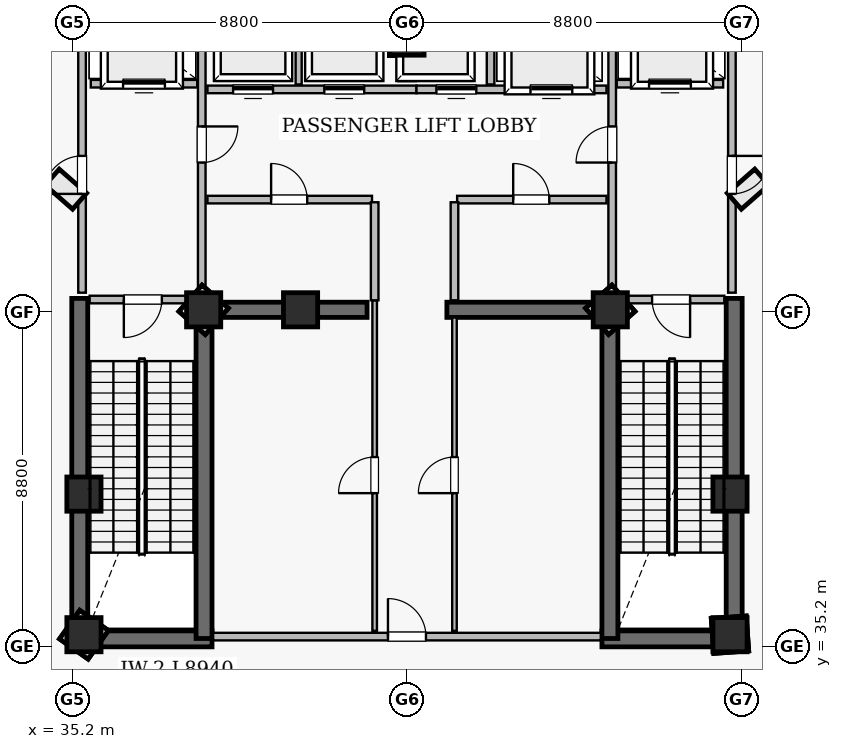
"""IFC4 building model, lengths in metres.
Left out: names, types, materials, properties, quantities, classifications, styles, units other than length and angle.
Written with IfcOpenShell. Run it as: python <this file> out.ifc"""

import sys

from ifc_helpers import new_model, si_unit, direction, frame, frame_2d, origin, origin_2d, place, context, subcontext, project, spatial, rectangle, extrude, element, fill, save


model = new_model("IFC4")
c1 = context("Model", 3, precision=1e-05, world=origin(), true_north=direction((0.0, 1.0)))
c2 = subcontext(c1, "Body", "Model", "MODEL_VIEW")
j1 = project(units=[si_unit("LENGTHUNIT", "METRE"), si_unit("PLANEANGLEUNIT", "RADIAN")], contexts=[c1])
p1 = place(None, origin())
s1 = spatial("IfcSite", under=j1, at=p1, CompositionType="ELEMENT")
p2 = place(p1, origin())
s2 = spatial("IfcBuilding", under=s1, at=p2, CompositionType="ELEMENT")
p3 = place(p2, frame((0.0, 0.0, 282.8)))
s3 = spatial("IfcBuildingStorey", under=s2, at=p3, CompositionType="ELEMENT", Elevation=282.8)
for number, where, z_axis, x_axis in (
    (1, (35.18, 35.39, 0.0), (0.0, 0.0, 1.0), (1.0, 0.0, 0.0)),
    (2, (49.13, 35.39, 0.0), (0.0, 0.0, 1.0), (1.0, 0.0, 0.0)),
):
    element("IfcWall", number, at=place(p3, frame(where, z_axis=z_axis, x_axis=x_axis)), inside=s3, PredefinedType="SHEAR", context=c2, shape_type="SweptSolid", body=[
        extrude(rectangle(XDim=3.69, YDim=0.42, at=frame_2d((1.845, 0.0))), origin(), (0.0, 0.0, 1.0), 6.51),
    ])
for number, where, z_axis, x_axis in (
    (3, (35.39, 35.18, 0.0), (0.0, 0.0, 1.0), (0.0, 1.0, 0.0)),
    (4, (52.61, 35.18, 0.0), (0.0, 0.0, 1.0), (0.0, 1.0, 0.0)),
):
    element("IfcWall", number, at=place(p3, frame(where, z_axis=z_axis, x_axis=x_axis)), inside=s3, PredefinedType="SHEAR", context=c2, shape_type="SweptSolid", body=[
        extrude(rectangle(XDim=9.17, YDim=0.42, at=frame_2d((4.585, 0.0))), origin(), (0.0, 0.0, 1.0), 6.51),
    ])
for number, where, z_axis, x_axis in (
    (5, (38.66, 35.4, 0.0), (0.0, 0.0, 1.0), (0.0, 1.0, 0.0)),
    (6, (49.34, 35.4, 0.0), (0.0, 0.0, 1.0), (0.0, 1.0, 0.0)),
):
    element("IfcWall", number, at=place(p3, frame(where, z_axis=z_axis, x_axis=x_axis)), inside=s3, PredefinedType="SHEAR", context=c2, shape_type="SweptSolid", body=[
        extrude(rectangle(XDim=8.95, YDim=0.42, at=frame_2d((4.475, 0.0))), origin(), (0.0, 0.0, 1.0), 6.51),
    ])
p4 = place(p3, frame((44.0, 50.1, 0.0), z_axis=(0.0, 0.0, 1.0), x_axis=(0.0, 1.0, 0.0)))
e7 = element("IfcWall", 7, at=p4, inside=s3, PredefinedType="SHEAR", context=c2, shape_type="SweptSolid", body=[
    extrude(rectangle(XDim=2.1, YDim=0.4, at=frame_2d((1.05, 0.0))), origin(), (0.0, 0.0, 1.0), 6.51),
])
for number, where, z_axis, x_axis in (
    (8, (38.75, 44.05, 0.0), (0.0, 0.0, 1.0), (1.0, 0.0, 0.0)),
    (9, (45.05, 44.05, 0.0), (0.0, 0.0, 1.0), (1.0, 0.0, 0.0)),
):
    element("IfcWall", number, at=place(p3, frame(where, z_axis=z_axis, x_axis=x_axis)), inside=s3, PredefinedType="SHEAR", context=c2, shape_type="SweptSolid", body=[
        extrude(rectangle(XDim=4.2, YDim=0.4, at=frame_2d((2.1, 0.0))), origin(), (0.0, 0.0, 1.0), 6.51),
    ])
for number, where, z_axis, x_axis in (
    (10, (35.5, 35.5, 0.0), (0.0, 0.0, 1.0), (1.0, 0.0, 0.0)),
    (11, (38.65, 44.05, 0.0), (0.0, 0.0, 1.0), (1.0, 0.0, 0.0)),
    (12, (52.5, 35.5, 0.0), (0.0, 0.0, 1.0), (1.0, 0.0, 0.0)),
    (13, (52.5, 39.2, 0.0), (0.0, 0.0, 1.0), (1.0, 0.0, 0.0)),
    (14, (49.35, 44.05, 0.0), (0.0, 0.0, 1.0), (1.0, 0.0, 0.0)),
    (15, (44.0, 51.2, 0.0), (0.0, 0.0, 1.0), (1.0, 0.0, 0.0)),
    (16, (35.5, 39.2, 0.0), (0.0, 0.0, 1.0), (1.0, 0.0, 0.0)),
    (17, (41.2, 44.05, 0.0), (0.0, 0.0, 1.0), (1.0, 0.0, 0.0)),
):
    element("IfcColumn", number, at=place(p3, frame(where, z_axis=z_axis, x_axis=x_axis)), inside=s3, PredefinedType="COLUMN", context=c2, shape_type="SweptSolid", body=[
        extrude(rectangle(XDim=0.9, YDim=0.9, at=origin_2d()), origin(), (0.0, 0.0, 1.0), 6.8),
    ])
p5 = place(p3, frame((38.9, 35.45, 0.0), z_axis=(0.0, 0.0, 1.0), x_axis=(1.0, 0.0, 0.0)))
e18 = element("IfcWall", 18, at=p5, inside=s3, PredefinedType="SOLIDWALL", context=c2, shape_type="SweptSolid", body=[
    extrude(rectangle(XDim=10.2, YDim=0.2, at=frame_2d((5.1, 0.0))), origin(), (0.0, 0.0, 1.0), 6.51),
])
p6 = place(p5, frame((4.6, 0.0, 0.0)))
e19 = element("IfcOpeningElement", 19, at=p6, cuts=e18, PredefinedType="OPENING", context=c2, shape_type="SweptSolid", body=[
    extrude(rectangle(XDim=1.0, YDim=2.15, at=frame_2d((0.5, 1.075))), frame((0.0, 0.11, 0.0), z_axis=(0.0, -1.0, 0.0), x_axis=(1.0, 0.0, 0.0)), (0.0, 0.0, 1.0), 0.22),
])
p7 = place(p3, frame((43.15, 35.6, 0.0), z_axis=(0.0, 0.0, 1.0), x_axis=(0.0, 1.0, 0.0)))
e20 = element("IfcWall", 20, at=p7, inside=s3, PredefinedType="PARTITIONING", context=c2, shape_type="SweptSolid", body=[
    extrude(rectangle(XDim=8.7, YDim=0.12, at=frame_2d((4.35, 0.0))), origin(), (0.0, 0.0, 1.0), 6.51),
])
p8 = place(p7, frame((3.625, 0.0, 0.0)))
e21 = element("IfcOpeningElement", 21, at=p8, cuts=e20, PredefinedType="OPENING", context=c2, shape_type="SweptSolid", body=[
    extrude(rectangle(XDim=0.95, YDim=2.1, at=frame_2d((0.475, 1.05))), frame((0.0, 0.07, 0.0), z_axis=(0.0, -1.0, 0.0), x_axis=(1.0, 0.0, 0.0)), (0.0, 0.0, 1.0), 0.14),
])
p9 = place(p3, frame((45.25, 35.6, 0.0), z_axis=(0.0, 0.0, 1.0), x_axis=(0.0, 1.0, 0.0)))
e22 = element("IfcWall", 22, at=p9, inside=s3, PredefinedType="PARTITIONING", context=c2, shape_type="SweptSolid", body=[
    extrude(rectangle(XDim=8.25, YDim=0.12, at=frame_2d((4.125, 0.0))), origin(), (0.0, 0.0, 1.0), 6.51),
])
p10 = place(p9, frame((3.625, 0.0, 0.0)))
e23 = element("IfcOpeningElement", 23, at=p10, cuts=e22, PredefinedType="OPENING", context=c2, shape_type="SweptSolid", body=[
    extrude(rectangle(XDim=0.95, YDim=2.1, at=frame_2d((0.475, 1.05))), frame((0.0, 0.07, 0.0), z_axis=(0.0, -1.0, 0.0), x_axis=(1.0, 0.0, 0.0)), (0.0, 0.0, 1.0), 0.14),
])
p11 = place(p3, frame((35.45, 44.5, 0.0), z_axis=(0.0, 0.0, 1.0), x_axis=(0.0, 1.0, 0.0)))
e24 = element("IfcWall", 24, at=p11, inside=s3, PredefinedType="SOLIDWALL", context=c2, shape_type="SweptSolid", body=[
    extrude(rectangle(XDim=7.92, YDim=0.2, at=frame_2d((3.96, 0.0))), origin(), (0.0, 0.0, 1.0), 6.51),
])
p12 = place(p11, frame((2.6, 0.0, 0.0)))
e25 = element("IfcOpeningElement", 25, at=p12, cuts=e24, PredefinedType="OPENING", context=c2, shape_type="SweptSolid", body=[
    extrude(rectangle(XDim=1.0, YDim=2.15, at=frame_2d((0.5, 1.075))), frame((0.0, 0.11, 0.0), z_axis=(0.0, -1.0, 0.0), x_axis=(1.0, 0.0, 0.0)), (0.0, 0.0, 1.0), 0.22),
])
p13 = place(p3, frame((52.55, 44.5, 0.0), z_axis=(0.0, 0.0, 1.0), x_axis=(0.0, 1.0, 0.0)))
e26 = element("IfcWall", 26, at=p13, inside=s3, PredefinedType="SOLIDWALL", context=c2, shape_type="SweptSolid", body=[
    extrude(rectangle(XDim=7.92, YDim=0.2, at=frame_2d((3.96, 0.0))), origin(), (0.0, 0.0, 1.0), 6.51),
])
p14 = place(p13, frame((2.6, 0.0, 0.0)))
e27 = element("IfcOpeningElement", 27, at=p14, cuts=e26, PredefinedType="OPENING", context=c2, shape_type="SweptSolid", body=[
    extrude(rectangle(XDim=1.0, YDim=2.15, at=frame_2d((0.5, 1.075))), frame((0.0, 0.11, 0.0), z_axis=(0.0, -1.0, 0.0), x_axis=(1.0, 0.0, 0.0)), (0.0, 0.0, 1.0), 0.22),
])
p15 = place(p3, frame((38.6, 44.5, 0.0), z_axis=(0.0, 0.0, 1.0), x_axis=(0.0, 1.0, 0.0)))
e28 = element("IfcWall", 28, at=p15, inside=s3, PredefinedType="SOLIDWALL", context=c2, shape_type="SweptSolid", body=[
    extrude(rectangle(XDim=7.92, YDim=0.2, at=frame_2d((3.96, 0.0))), origin(), (0.0, 0.0, 1.0), 6.51),
])
p16 = place(p15, frame((3.425, 0.0, 0.0)))
e29 = element("IfcOpeningElement", 29, at=p16, cuts=e28, PredefinedType="OPENING", context=c2, shape_type="SweptSolid", body=[
    extrude(rectangle(XDim=0.95, YDim=2.15, at=frame_2d((0.475, 1.075))), frame((0.0, 0.11, 0.0), z_axis=(0.0, -1.0, 0.0), x_axis=(1.0, 0.0, 0.0)), (0.0, 0.0, 1.0), 0.22),
])
p17 = place(p3, frame((49.4, 44.5, 0.0), z_axis=(0.0, 0.0, 1.0), x_axis=(0.0, 1.0, 0.0)))
e30 = element("IfcWall", 30, at=p17, inside=s3, PredefinedType="SOLIDWALL", context=c2, shape_type="SweptSolid", body=[
    extrude(rectangle(XDim=7.92, YDim=0.2, at=frame_2d((3.96, 0.0))), origin(), (0.0, 0.0, 1.0), 5.598),
])
p18 = place(p17, frame((3.425, 0.0, 0.0)))
e31 = element("IfcOpeningElement", 31, at=p18, cuts=e30, PredefinedType="OPENING", context=c2, shape_type="SweptSolid", body=[
    extrude(rectangle(XDim=0.95, YDim=2.15, at=frame_2d((0.475, 1.075))), frame((0.0, 0.11, 0.0), z_axis=(0.0, -1.0, 0.0), x_axis=(1.0, 0.0, 0.0)), (0.0, 0.0, 1.0), 0.22),
])
p19 = place(p3, frame((38.75, 49.85, 0.0), z_axis=(0.0, 0.0, 1.0), x_axis=(1.0, 0.0, 0.0)))
e32 = element("IfcWall", 32, at=p19, inside=s3, PredefinedType="SOLIDWALL", context=c2, shape_type="SweptSolid", body=[
    extrude(rectangle(XDim=5.5, YDim=0.2, at=frame_2d((2.75, 0.0))), origin(), (0.0, 0.0, 1.0), 6.51),
])
p20 = place(p19, frame((0.675, 0.0, 0.0)))
e33 = element("IfcOpeningElement", 33, at=p20, cuts=e32, PredefinedType="OPENING", context=c2, shape_type="SweptSolid", body=[
    extrude(rectangle(XDim=1.05, YDim=2.15, at=frame_2d((0.525, 1.075))), frame((0.0, 0.11, 0.0), z_axis=(0.0, -1.0, 0.0), x_axis=(1.0, 0.0, 0.0)), (0.0, 0.0, 1.0), 0.22),
])
p21 = place(p19, frame((3.075, 0.0, 0.0)))
e34 = element("IfcOpeningElement", 34, at=p21, cuts=e32, PredefinedType="OPENING", context=c2, shape_type="SweptSolid", body=[
    extrude(rectangle(XDim=1.05, YDim=2.15, at=frame_2d((0.525, 1.075))), frame((0.0, 0.11, 0.0), z_axis=(0.0, -1.0, 0.0), x_axis=(1.0, 0.0, 0.0)), (0.0, 0.0, 1.0), 0.22),
])
p22 = place(p3, frame((44.25, 49.85, 0.0), z_axis=(0.0, 0.0, 1.0), x_axis=(1.0, 0.0, 0.0)))
e35 = element("IfcWall", 35, at=p22, inside=s3, PredefinedType="SOLIDWALL", context=c2, shape_type="SweptSolid", body=[
    extrude(rectangle(XDim=5.0, YDim=0.2, at=frame_2d((2.5, 0.0))), origin(), (0.0, 0.0, 1.0), 5.598),
])
p23 = place(p22, frame((0.525, 0.0, 0.0)))
e36 = element("IfcOpeningElement", 36, at=p23, cuts=e35, PredefinedType="OPENING", context=c2, shape_type="SweptSolid", body=[
    extrude(rectangle(XDim=1.05, YDim=2.15, at=frame_2d((0.525, 1.075))), frame((0.0, 0.11, 0.0), z_axis=(0.0, -1.0, 0.0), x_axis=(1.0, 0.0, 0.0)), (0.0, 0.0, 1.0), 0.22),
])
p24 = place(p22, frame((3.0, 0.0, 0.0)))
e37 = element("IfcOpeningElement", 37, at=p24, cuts=e35, PredefinedType="OPENING", context=c2, shape_type="SweptSolid", body=[
    extrude(rectangle(XDim=1.1, YDim=2.15, at=frame_2d((0.55, 1.075))), frame((0.0, 0.11, 0.0), z_axis=(0.0, -1.0, 0.0), x_axis=(1.0, 0.0, 0.0)), (0.0, 0.0, 1.0), 0.22),
])
p25 = place(p3, frame((38.75, 46.95, 0.0), z_axis=(0.0, 0.0, 1.0), x_axis=(1.0, 0.0, 0.0)))
e38 = element("IfcWall", 38, at=p25, inside=s3, PredefinedType="SOLIDWALL", context=c2, shape_type="SweptSolid", body=[
    extrude(rectangle(XDim=4.33, YDim=0.2, at=frame_2d((2.165, 0.0))), origin(), (0.0, 0.0, 1.0), 6.51),
])
p26 = place(p25, frame((1.675, 0.0, 0.0)))
e39 = element("IfcOpeningElement", 39, at=p26, cuts=e38, PredefinedType="OPENING", context=c2, shape_type="SweptSolid", body=[
    extrude(rectangle(XDim=0.95, YDim=2.1, at=frame_2d((0.475, 1.05))), frame((0.0, 0.11, 0.0), z_axis=(0.0, -1.0, 0.0), x_axis=(1.0, 0.0, 0.0)), (0.0, 0.0, 1.0), 0.22),
])
p27 = place(p3, frame((45.32, 46.95, 0.0), z_axis=(0.0, 0.0, 1.0), x_axis=(1.0, 0.0, 0.0)))
e40 = element("IfcWall", 40, at=p27, inside=s3, PredefinedType="SOLIDWALL", context=c2, shape_type="SweptSolid", body=[
    extrude(rectangle(XDim=3.93, YDim=0.2, at=frame_2d((1.965, 0.0))), origin(), (0.0, 0.0, 1.0), 5.598),
])
p28 = place(p27, frame((1.475, 0.0, 0.0)))
e41 = element("IfcOpeningElement", 41, at=p28, cuts=e40, PredefinedType="OPENING", context=c2, shape_type="SweptSolid", body=[
    extrude(rectangle(XDim=0.95, YDim=2.1, at=frame_2d((0.475, 1.05))), frame((0.0, 0.11, 0.0), z_axis=(0.0, -1.0, 0.0), x_axis=(1.0, 0.0, 0.0)), (0.0, 0.0, 1.0), 0.22),
])
p29 = place(p3, frame((35.65, 44.32, 0.0), z_axis=(0.0, 0.0, 1.0), x_axis=(1.0, 0.0, 0.0)))
e42 = element("IfcWall", 42, at=p29, inside=s3, PredefinedType="SOLIDWALL", context=c2, shape_type="SweptSolid", body=[
    extrude(rectangle(XDim=2.8, YDim=0.2, at=frame_2d((1.4, 0.0))), origin(), (0.0, 0.0, 1.0), 6.51),
])
p30 = place(p29, frame((0.9, 0.0, 0.0)))
e43 = element("IfcOpeningElement", 43, at=p30, cuts=e42, PredefinedType="OPENING", context=c2, shape_type="SweptSolid", body=[
    extrude(rectangle(XDim=1.0, YDim=2.15, at=frame_2d((0.5, 1.075))), frame((0.0, 0.11, 0.0), z_axis=(0.0, -1.0, 0.0), x_axis=(1.0, 0.0, 0.0)), (0.0, 0.0, 1.0), 0.22),
])
p31 = place(p3, frame((49.55, 44.32, 0.0), z_axis=(0.0, 0.0, 1.0), x_axis=(1.0, 0.0, 0.0)))
e44 = element("IfcWall", 44, at=p31, inside=s3, PredefinedType="SOLIDWALL", context=c2, shape_type="SweptSolid", body=[
    extrude(rectangle(XDim=2.8, YDim=0.2, at=frame_2d((1.4, 0.0))), origin(), (0.0, 0.0, 1.0), 5.598),
])
p32 = place(p31, frame((0.9, 0.0, 0.0)))
e45 = element("IfcOpeningElement", 45, at=p32, cuts=e44, PredefinedType="OPENING", context=c2, shape_type="SweptSolid", body=[
    extrude(rectangle(XDim=1.0, YDim=2.15, at=frame_2d((0.5, 1.075))), frame((0.0, 0.11, 0.0), z_axis=(0.0, -1.0, 0.0), x_axis=(1.0, 0.0, 0.0)), (0.0, 0.0, 1.0), 0.22),
])
p33 = place(p3, frame((35.68, 50.0, 0.0), z_axis=(0.0, 0.0, 1.0), x_axis=(1.0, 0.0, 0.0)))
e46 = element("IfcWall", 46, at=p33, inside=s3, PredefinedType="SOLIDWALL", context=c2, shape_type="SweptSolid", body=[
    extrude(rectangle(XDim=2.8, YDim=0.2, at=frame_2d((1.4, 0.0))), origin(), (0.0, 0.0, 1.0), 6.51),
])
p34 = place(p33, frame((0.85, 0.0, 0.0)))
e47 = element("IfcOpeningElement", 47, at=p34, cuts=e46, PredefinedType="OPENING", context=c2, shape_type="SweptSolid", body=[
    extrude(rectangle(XDim=1.1, YDim=2.15, at=frame_2d((0.55, 1.075))), frame((0.0, 0.11, 0.0), z_axis=(0.0, -1.0, 0.0), x_axis=(1.0, 0.0, 0.0)), (0.0, 0.0, 1.0), 0.22),
])
p35 = place(p3, frame((49.52, 50.0, 0.0), z_axis=(0.0, 0.0, 1.0), x_axis=(1.0, 0.0, 0.0)))
e48 = element("IfcWall", 48, at=p35, inside=s3, PredefinedType="SOLIDWALL", context=c2, shape_type="SweptSolid", body=[
    extrude(rectangle(XDim=2.8, YDim=0.2, at=frame_2d((1.4, 0.0))), origin(), (0.0, 0.0, 1.0), 6.51),
])
p36 = place(p35, frame((0.85, 0.0, 0.0)))
e49 = element("IfcOpeningElement", 49, at=p36, cuts=e48, PredefinedType="OPENING", context=c2, shape_type="SweptSolid", body=[
    extrude(rectangle(XDim=1.1, YDim=2.15, at=frame_2d((0.55, 1.075))), frame((0.0, 0.11, 0.0), z_axis=(0.0, -1.0, 0.0), x_axis=(1.0, 0.0, 0.0)), (0.0, 0.0, 1.0), 0.22),
])
for number, where, z_axis, x_axis in (
    (50, (43.15, 44.3, 0.0), (0.0, 0.0, 1.0), (0.0, 1.0, 0.0)),
    (51, (45.25, 44.3, 0.0), (0.0, 0.0, 1.0), (0.0, 1.0, 0.0)),
):
    element("IfcWall", number, at=place(p3, frame(where, z_axis=z_axis, x_axis=x_axis)), inside=s3, PredefinedType="SOLIDWALL", context=c2, shape_type="SweptSolid", body=[
        extrude(rectangle(XDim=2.58, YDim=0.2, at=frame_2d((1.29, 0.0))), origin(), (0.0, 0.0, 1.0), 6.51),
    ])
p37 = place(p3, frame((41.15, 49.98, 0.0), z_axis=(0.0, 0.0, 1.0), x_axis=(0.0, 1.0, 0.0)))
e52 = element("IfcWall", 52, at=p37, inside=s3, PredefinedType="SOLIDWALL", context=c2, shape_type="SweptSolid", body=[
    extrude(rectangle(XDim=2.37, YDim=0.16, at=frame_2d((1.185, 0.0))), origin(), (0.0, 0.0, 1.0), 6.51),
])
p38 = place(p3, frame((46.2, 49.98, 0.0), z_axis=(0.0, 0.0, 1.0), x_axis=(0.0, 1.0, 0.0)))
e53 = element("IfcWall", 53, at=p38, inside=s3, PredefinedType="SOLIDWALL", context=c2, shape_type="SweptSolid", body=[
    extrude(rectangle(XDim=2.37, YDim=0.2, at=frame_2d((1.185, 0.0))), origin(), (0.0, 0.0, 1.0), 6.51),
])
p39 = place(p30, frame((1.0, 0.0, 0.0), z_axis=(0.0, 0.0, 1.0), x_axis=(-1.0, 0.0, 0.0)))
e54 = element("IfcDoor", 54, at=p39, inside=s3, OperationType="SINGLE_SWING_LEFT", PredefinedType="DOOR", context=c2, shape_type="SweptSolid", body=[
    extrude(rectangle(XDim=1.0, YDim=2.15, at=frame_2d((0.5, 1.075))), frame((0.0, 0.025, 0.0), z_axis=(0.0, -1.0, 0.0), x_axis=(1.0, 0.0, 0.0)), (0.0, 0.0, 1.0), 0.05),
])
fill(e43, e54)
p40 = place(p32, frame((1.0, 0.0, 0.0), z_axis=(0.0, 0.0, 1.0), x_axis=(-1.0, 0.0, 0.0)))
e55 = element("IfcDoor", 55, at=p40, inside=s3, OperationType="SINGLE_SWING_RIGHT", PredefinedType="DOOR", context=c2, shape_type="SweptSolid", body=[
    extrude(rectangle(XDim=1.0, YDim=2.15, at=frame_2d((0.5, 1.075))), frame((0.0, 0.025, 0.0), z_axis=(0.0, -1.0, 0.0), x_axis=(1.0, 0.0, 0.0)), (0.0, 0.0, 1.0), 0.05),
])
fill(e45, e55)
p41 = place(p12, origin())
e56 = element("IfcDoor", 56, at=p41, inside=s3, OperationType="SINGLE_SWING_LEFT", PredefinedType="DOOR", context=c2, shape_type="SweptSolid", body=[
    extrude(rectangle(XDim=1.0, YDim=2.15, at=frame_2d((0.5, 1.075))), frame((0.0, 0.025, 0.0), z_axis=(0.0, -1.0, 0.0), x_axis=(1.0, 0.0, 0.0)), (0.0, 0.0, 1.0), 0.05),
])
fill(e25, e56)
p42 = place(p14, frame((1.0, 0.0, 0.0), z_axis=(0.0, 0.0, 1.0), x_axis=(-1.0, 0.0, 0.0)))
e57 = element("IfcDoor", 57, at=p42, inside=s3, OperationType="SINGLE_SWING_RIGHT", PredefinedType="DOOR", context=c2, shape_type="SweptSolid", body=[
    extrude(rectangle(XDim=1.0, YDim=2.15, at=frame_2d((0.5, 1.075))), frame((0.0, 0.025, 0.0), z_axis=(0.0, -1.0, 0.0), x_axis=(1.0, 0.0, 0.0)), (0.0, 0.0, 1.0), 0.05),
])
fill(e27, e57)
p43 = place(p16, frame((0.95, 0.0, 0.0), z_axis=(0.0, 0.0, 1.0), x_axis=(-1.0, 0.0, 0.0)))
e58 = element("IfcDoor", 58, at=p43, inside=s3, OperationType="SINGLE_SWING_RIGHT", PredefinedType="DOOR", context=c2, shape_type="SweptSolid", body=[
    extrude(rectangle(XDim=0.95, YDim=2.15, at=frame_2d((0.475, 1.075))), frame((0.0, 0.025, 0.0), z_axis=(0.0, -1.0, 0.0), x_axis=(1.0, 0.0, 0.0)), (0.0, 0.0, 1.0), 0.05),
])
fill(e29, e58)
p44 = place(p18, origin())
e59 = element("IfcDoor", 59, at=p44, inside=s3, OperationType="SINGLE_SWING_LEFT", PredefinedType="DOOR", context=c2, shape_type="SweptSolid", body=[
    extrude(rectangle(XDim=0.95, YDim=2.15, at=frame_2d((0.475, 1.075))), frame((0.0, 0.025, 0.0), z_axis=(0.0, -1.0, 0.0), x_axis=(1.0, 0.0, 0.0)), (0.0, 0.0, 1.0), 0.05),
])
fill(e31, e59)
p45 = place(p34, origin())
e60 = element("IfcDoor", 60, at=p45, inside=s3, OperationType="SLIDING_TO_LEFT", PredefinedType="DOOR", context=c2, shape_type="SweptSolid", body=[
    extrude(rectangle(XDim=1.1, YDim=2.15, at=frame_2d((0.55, 1.075))), frame((0.0, 0.025, 0.0), z_axis=(0.0, -1.0, 0.0), x_axis=(1.0, 0.0, 0.0)), (0.0, 0.0, 1.0), 0.05),
])
fill(e47, e60)
p46 = place(p36, origin())
e61 = element("IfcDoor", 61, at=p46, inside=s3, OperationType="SLIDING_TO_LEFT", PredefinedType="DOOR", context=c2, shape_type="SweptSolid", body=[
    extrude(rectangle(XDim=1.1, YDim=2.15, at=frame_2d((0.55, 1.075))), frame((0.0, 0.025, 0.0), z_axis=(0.0, -1.0, 0.0), x_axis=(1.0, 0.0, 0.0)), (0.0, 0.0, 1.0), 0.05),
])
fill(e49, e61)
p47 = place(p6, origin())
e62 = element("IfcDoor", 62, at=p47, inside=s3, OperationType="SINGLE_SWING_LEFT", PredefinedType="DOOR", context=c2, shape_type="SweptSolid", body=[
    extrude(rectangle(XDim=1.0, YDim=2.15, at=frame_2d((0.5, 1.075))), frame((0.0, 0.025, 0.0), z_axis=(0.0, -1.0, 0.0), x_axis=(1.0, 0.0, 0.0)), (0.0, 0.0, 1.0), 0.05),
])
fill(e19, e62)
p48 = place(p20, origin())
e63 = element("IfcDoor", 63, at=p48, inside=s3, OperationType="SLIDING_TO_LEFT", PredefinedType="DOOR", context=c2, shape_type="SweptSolid", body=[
    extrude(rectangle(XDim=1.05, YDim=2.15, at=frame_2d((0.525, 1.075))), frame((0.0, 0.025, 0.0), z_axis=(0.0, -1.0, 0.0), x_axis=(1.0, 0.0, 0.0)), (0.0, 0.0, 1.0), 0.05),
])
fill(e33, e63)
p49 = place(p21, origin())
e64 = element("IfcDoor", 64, at=p49, inside=s3, OperationType="SLIDING_TO_LEFT", PredefinedType="DOOR", context=c2, shape_type="SweptSolid", body=[
    extrude(rectangle(XDim=1.05, YDim=2.15, at=frame_2d((0.525, 1.075))), frame((0.0, 0.025, 0.0), z_axis=(0.0, -1.0, 0.0), x_axis=(1.0, 0.0, 0.0)), (0.0, 0.0, 1.0), 0.05),
])
fill(e34, e64)
p50 = place(p23, origin())
e65 = element("IfcDoor", 65, at=p50, inside=s3, OperationType="SLIDING_TO_LEFT", PredefinedType="DOOR", context=c2, shape_type="SweptSolid", body=[
    extrude(rectangle(XDim=1.05, YDim=2.15, at=frame_2d((0.525, 1.075))), frame((0.0, 0.025, 0.0), z_axis=(0.0, -1.0, 0.0), x_axis=(1.0, 0.0, 0.0)), (0.0, 0.0, 1.0), 0.05),
])
fill(e36, e65)
p51 = place(p24, origin())
e66 = element("IfcDoor", 66, at=p51, inside=s3, OperationType="SLIDING_TO_LEFT", PredefinedType="DOOR", context=c2, shape_type="SweptSolid", body=[
    extrude(rectangle(XDim=1.1, YDim=2.15, at=frame_2d((0.55, 1.075))), frame((0.0, 0.025, 0.0), z_axis=(0.0, -1.0, 0.0), x_axis=(1.0, 0.0, 0.0)), (0.0, 0.0, 1.0), 0.05),
])
fill(e37, e66)
p52 = place(p26, origin())
e67 = element("IfcDoor", 67, at=p52, inside=s3, OperationType="SINGLE_SWING_LEFT", PredefinedType="DOOR", context=c2, shape_type="SweptSolid", body=[
    extrude(rectangle(XDim=0.95, YDim=2.1, at=frame_2d((0.475, 1.05))), frame((0.0, 0.025, 0.0), z_axis=(0.0, -1.0, 0.0), x_axis=(1.0, 0.0, 0.0)), (0.0, 0.0, 1.0), 0.05),
])
fill(e39, e67)
p53 = place(p28, origin())
e68 = element("IfcDoor", 68, at=p53, inside=s3, OperationType="SINGLE_SWING_LEFT", PredefinedType="DOOR", context=c2, shape_type="SweptSolid", body=[
    extrude(rectangle(XDim=0.95, YDim=2.1, at=frame_2d((0.475, 1.05))), frame((0.0, 0.025, 0.0), z_axis=(0.0, -1.0, 0.0), x_axis=(1.0, 0.0, 0.0)), (0.0, 0.0, 1.0), 0.05),
])
fill(e41, e68)
p54 = place(p8, origin())
e69 = element("IfcDoor", 69, at=p54, inside=s3, OperationType="SINGLE_SWING_LEFT", PredefinedType="DOOR", context=c2, shape_type="SweptSolid", body=[
    extrude(rectangle(XDim=0.95, YDim=2.1, at=frame_2d((0.475, 1.05))), frame((0.0, 0.025, 0.0), z_axis=(0.0, -1.0, 0.0), x_axis=(1.0, 0.0, 0.0)), (0.0, 0.0, 1.0), 0.05),
])
fill(e21, e69)
p55 = place(p10, origin())
e70 = element("IfcDoor", 70, at=p55, inside=s3, OperationType="SINGLE_SWING_LEFT", PredefinedType="DOOR", context=c2, shape_type="SweptSolid", body=[
    extrude(rectangle(XDim=0.95, YDim=2.1, at=frame_2d((0.475, 1.05))), frame((0.0, 0.025, 0.0), z_axis=(0.0, -1.0, 0.0), x_axis=(1.0, 0.0, 0.0)), (0.0, 0.0, 1.0), 0.05),
])
fill(e23, e70)
save(model, sys.argv[1])
